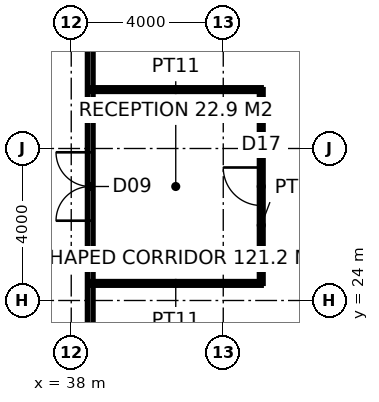
"""IFC4 building model, lengths in metres.
Left out: names, types, materials, properties, quantities, classifications, styles, units other than length and angle.
Written with IfcOpenShell. Run it as: python <this file> out.ifc"""

import sys

from ifc_helpers import new_model, si_unit, direction, frame, frame_2d, origin, place, context, subcontext, project, spatial, rectangle, extrude, element, fill, save


model = new_model("IFC4")
c1 = context("Model", 3, precision=1e-05, world=origin(), true_north=direction((0.0, 1.0)))
c2 = subcontext(c1, "Body", "Model", "MODEL_VIEW")
j1 = project(units=[si_unit("LENGTHUNIT", "METRE"), si_unit("PLANEANGLEUNIT", "RADIAN")], contexts=[c1])
p1 = place(None, origin())
s1 = spatial("IfcSite", under=j1, at=p1, CompositionType="ELEMENT")
p2 = place(p1, origin())
s2 = spatial("IfcBuilding", under=s1, at=p2, CompositionType="ELEMENT")
p3 = place(p2, frame((0.0, 0.0, 274.2)))
s3 = spatial("IfcBuildingStorey", under=s2, at=p3, CompositionType="ELEMENT", Elevation=274.2)
p4 = place(p3, frame((38.5, 15.625, 0.0), z_axis=(0.0, 0.0, 1.0), x_axis=(0.0, 1.0, 0.0)))
e1 = element("IfcWall", 1, at=p4, inside=s3, PredefinedType="PARTITIONING", context=c2, shape_type="SweptSolid", body=[
    extrude(rectangle(XDim=22.75, YDim=0.15, at=frame_2d((11.375, 0.0))), origin(), (0.0, 0.0, 1.0), 3.85),
])
p5 = place(p4, frame((10.475, 0.0, 0.0)))
e2 = element("IfcOpeningElement", 2, at=p5, cuts=e1, PredefinedType="OPENING", context=c2, shape_type="SweptSolid", body=[
    extrude(rectangle(XDim=1.8, YDim=2.4, at=frame_2d((0.9, 1.2))), frame((0.0, 0.085, 0.0), z_axis=(0.0, -1.0, 0.0), x_axis=(1.0, 0.0, 0.0)), (0.0, 0.0, 1.0), 0.17),
])
p6 = place(p3, frame((38.5, 24.45, 0.0), z_axis=(0.0, 0.0, 1.0), x_axis=(1.0, 0.0, 0.0)))
e3 = element("IfcWall", 3, at=p6, inside=s3, PredefinedType="PARTITIONING", context=c2, shape_type="SweptSolid", body=[
    extrude(rectangle(XDim=4.5, YDim=0.1, at=frame_2d((2.25, 0.0))), origin(), (0.0, 0.0, 1.0), 3.85),
])
p7 = place(p3, frame((43.0, 24.45, 0.0), z_axis=(0.0, 0.0, 1.0), x_axis=(0.0, 1.0, 0.0)))
e4 = element("IfcWall", 4, at=p7, inside=s3, PredefinedType="PARTITIONING", context=c2, shape_type="SweptSolid", body=[
    extrude(rectangle(XDim=5.1, YDim=0.1, at=frame_2d((2.55, 0.0))), origin(), (0.0, 0.0, 1.0), 3.85),
])
p8 = place(p7, frame((2.05, 0.0, 0.0)))
e5 = element("IfcOpeningElement", 5, at=p8, cuts=e4, PredefinedType="OPENING", context=c2, shape_type="SweptSolid", body=[
    extrude(rectangle(XDim=1.0, YDim=2.2, at=frame_2d((0.5, 1.1))), frame((0.0, 0.06, 0.0), z_axis=(0.0, -1.0, 0.0), x_axis=(1.0, 0.0, 0.0)), (0.0, 0.0, 1.0), 0.12),
])
p9 = place(p3, frame((43.0, 29.55, 0.0), z_axis=(0.0, 0.0, 1.0), x_axis=(-1.0, 0.0, 0.0)))
e6 = element("IfcWall", 6, at=p9, inside=s3, PredefinedType="PARTITIONING", context=c2, shape_type="SweptSolid", body=[
    extrude(rectangle(XDim=4.5, YDim=0.1, at=frame_2d((2.25, 0.0))), origin(), (0.0, 0.0, 1.0), 3.85),
])
p10 = place(p5, origin())
e7 = element("IfcDoor", 7, at=p10, inside=s3, OperationType="DOUBLE_DOOR_DOUBLE_SWING", PredefinedType="DOOR", context=c2, shape_type="SweptSolid", body=[
    extrude(rectangle(XDim=1.8, YDim=2.4, at=frame_2d((0.9, 1.2))), frame((0.0, 0.025, 0.0), z_axis=(0.0, -1.0, 0.0), x_axis=(1.0, 0.0, 0.0)), (0.0, 0.0, 1.0), 0.05),
])
fill(e2, e7)
p11 = place(p8, origin())
e8 = element("IfcDoor", 8, at=p11, inside=s3, OperationType="SINGLE_SWING_RIGHT", PredefinedType="DOOR", context=c2, shape_type="SweptSolid", body=[
    extrude(rectangle(XDim=1.0, YDim=2.2, at=frame_2d((0.5, 1.1))), frame((0.0, 0.025, 0.0), z_axis=(0.0, -1.0, 0.0), x_axis=(1.0, 0.0, 0.0)), (0.0, 0.0, 1.0), 0.05),
])
fill(e5, e8)
save(model, sys.argv[1])
